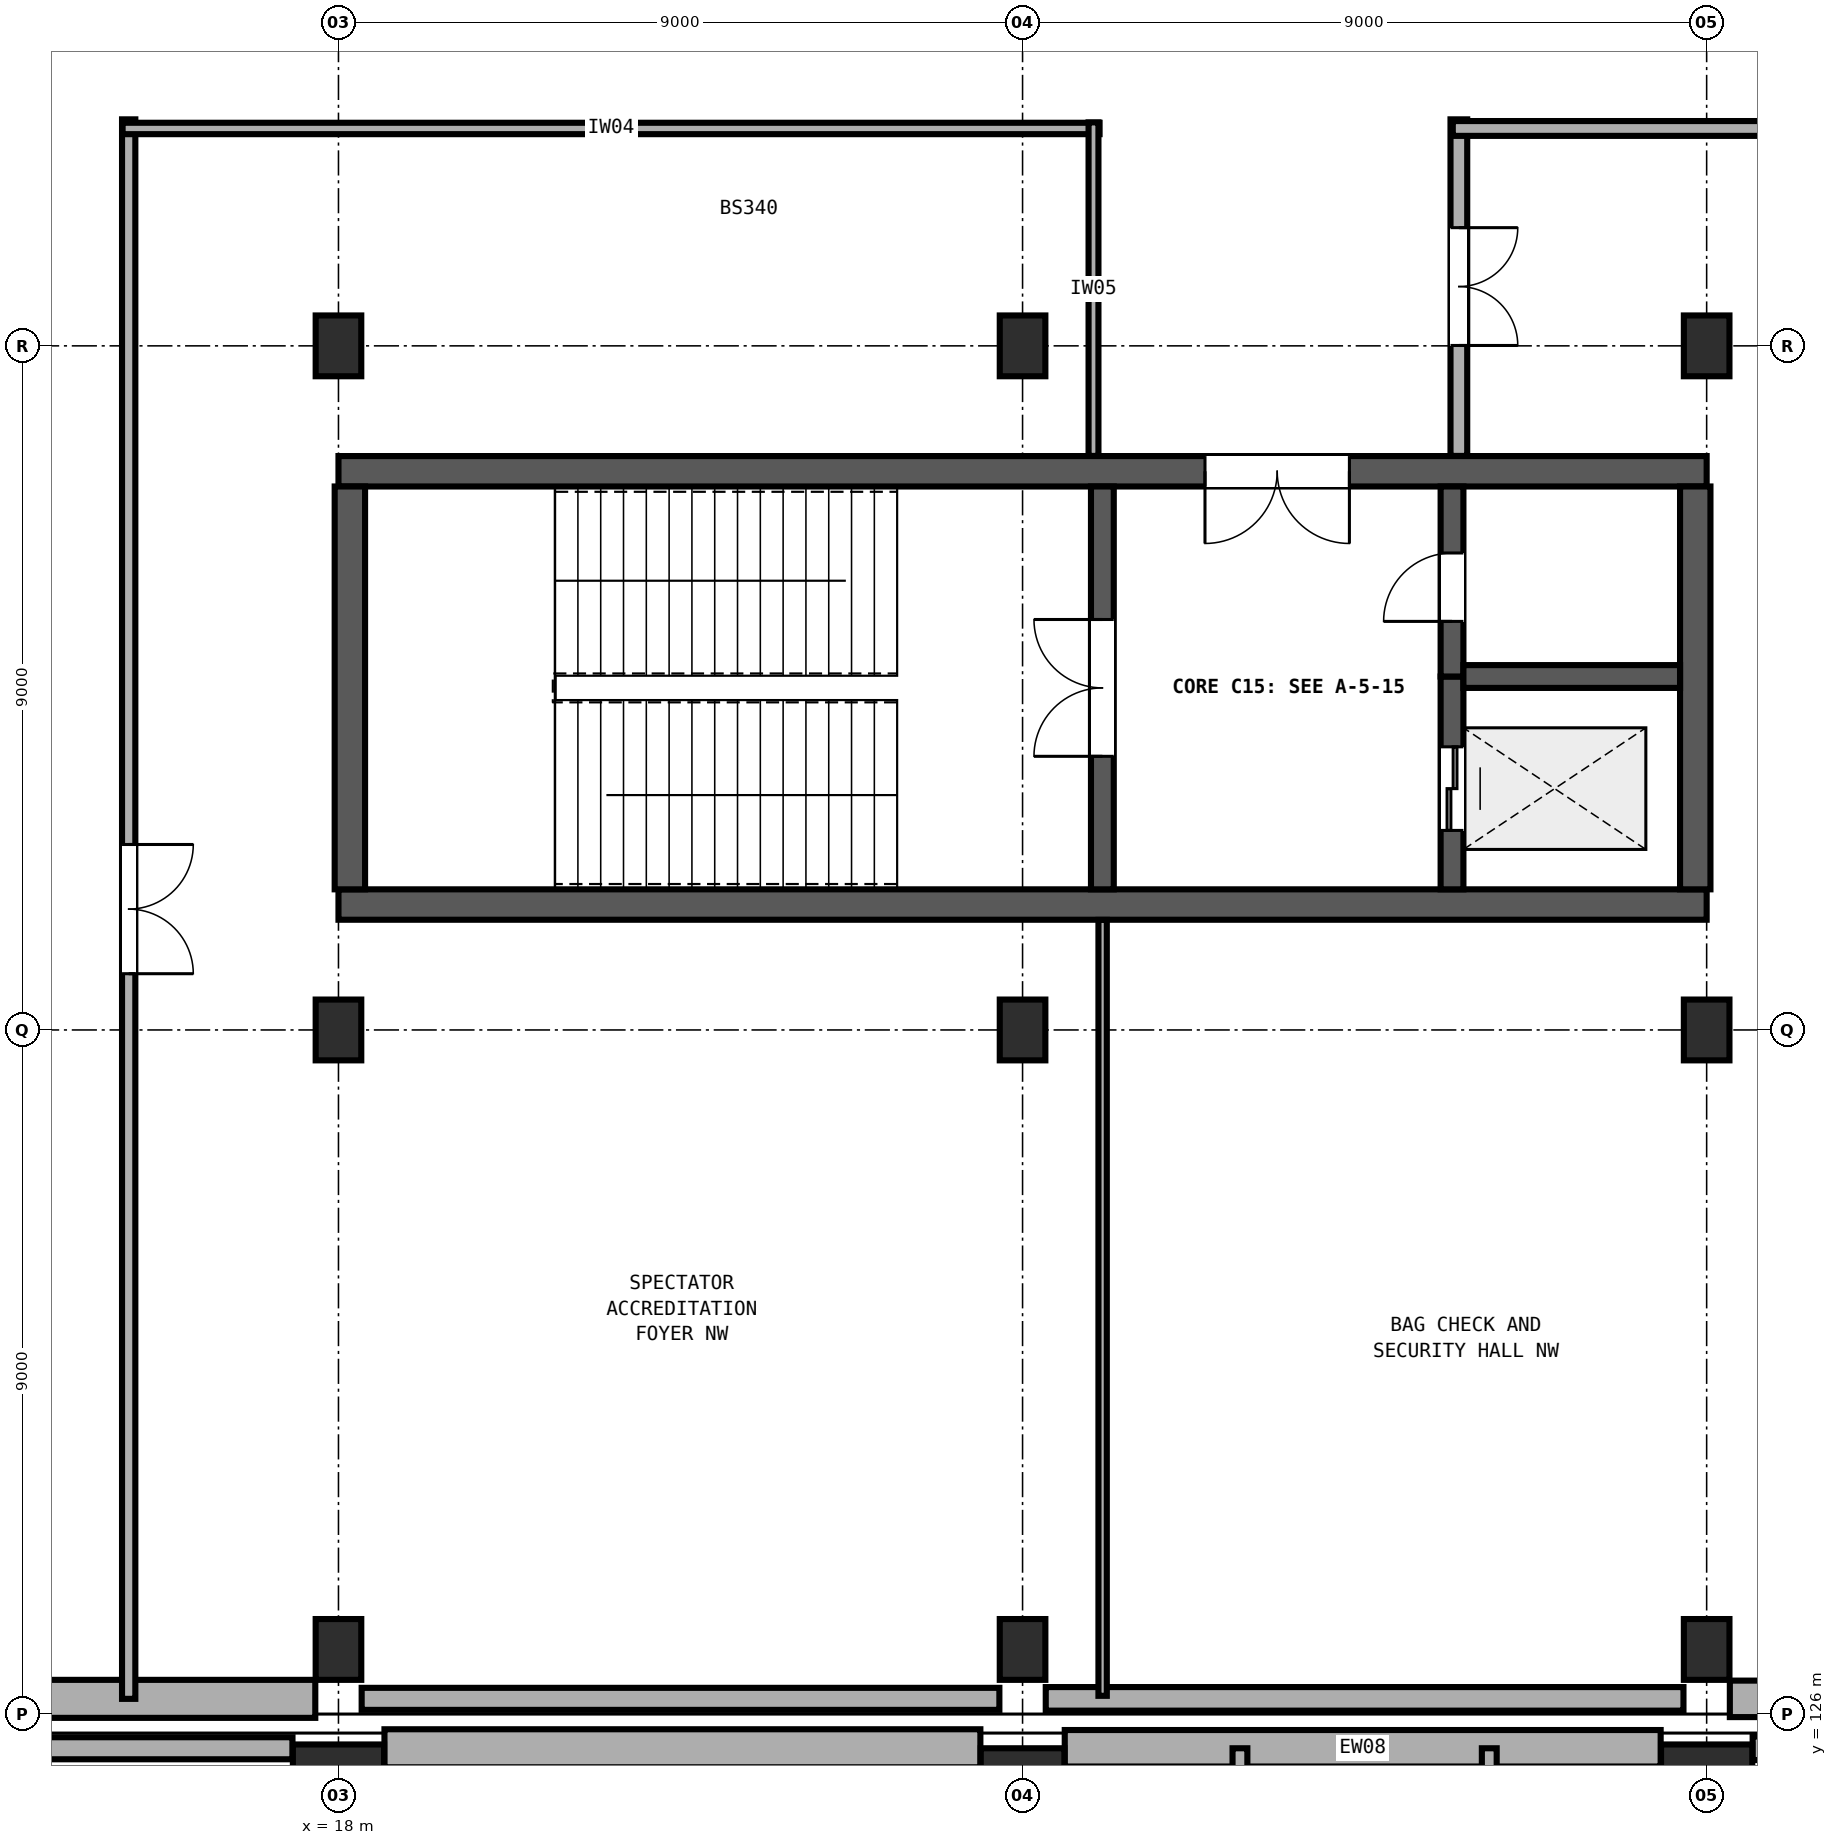
"""IFC4 building model, lengths in metres.
Left out: names, types, materials, properties, quantities, classifications, styles, units other than length and angle.
Written with IfcOpenShell. Run it as: python <this file> out.ifc"""

import sys

from ifc_helpers import new_model, si_unit, direction, frame, frame_2d, origin, origin_2d, place, context, subcontext, project, spatial, rectangle, extrude, element, fill, save


model = new_model("IFC4")
c1 = context("Model", 3, precision=1e-05, world=origin(), true_north=direction((0.0, 1.0)))
c2 = subcontext(c1, "Body", "Model", "MODEL_VIEW")
j1 = project(units=[si_unit("LENGTHUNIT", "METRE"), si_unit("PLANEANGLEUNIT", "RADIAN")], contexts=[c1])
p1 = place(None, origin())
s1 = spatial("IfcSite", under=j1, at=p1, CompositionType="ELEMENT")
p2 = place(p1, origin())
s2 = spatial("IfcBuilding", under=s1, at=p2, CompositionType="ELEMENT")
p3 = place(p2, origin())
s3 = spatial("IfcBuildingStorey", under=s2, at=p3, CompositionType="ELEMENT", Elevation=0.0)
p4 = place(p3, frame((18.0, 124.9, 0.0), z_axis=(0.0, 0.0, 1.0), x_axis=(1.0, 0.0, 0.0)))
e1 = element("IfcColumn", 1, at=p4, inside=s3, PredefinedType="COLUMN", context=c2, shape_type="SweptSolid", body=[
    extrude(rectangle(XDim=1.2, YDim=1.4, at=origin_2d()), origin(), (0.0, 0.0, 1.0), 4.8),
])
p5 = place(p3, frame((27.0, 124.9, 0.0), z_axis=(0.0, 0.0, 1.0), x_axis=(1.0, 0.0, 0.0)))
e2 = element("IfcColumn", 2, at=p5, inside=s3, PredefinedType="COLUMN", context=c2, shape_type="SweptSolid", body=[
    extrude(rectangle(XDim=1.1, YDim=1.3, at=origin_2d()), origin(), (0.0, 0.0, 1.0), 4.8),
])
p6 = place(p3, frame((36.0, 124.9, 0.0), z_axis=(0.0, 0.0, 1.0), x_axis=(1.0, 0.0, 0.0)))
e3 = element("IfcColumn", 3, at=p6, inside=s3, PredefinedType="COLUMN", context=c2, shape_type="SweptSolid", body=[
    extrude(rectangle(XDim=1.2, YDim=1.4, at=origin_2d()), origin(), (0.0, 0.0, 1.0), 4.8),
])
for number, where, z_axis, x_axis in (
    (4, (18.0, 126.85, 0.0), (0.0, 0.0, 1.0), (1.0, 0.0, 0.0)),
    (5, (18.0, 135.0, 0.0), (0.0, 0.0, 1.0), (1.0, 0.0, 0.0)),
    (6, (18.0, 144.0, 0.0), (0.0, 0.0, 1.0), (1.0, 0.0, 0.0)),
    (7, (27.0, 126.85, 0.0), (0.0, 0.0, 1.0), (1.0, 0.0, 0.0)),
    (8, (27.0, 135.0, 0.0), (0.0, 0.0, 1.0), (1.0, 0.0, 0.0)),
    (9, (27.0, 144.0, 0.0), (0.0, 0.0, 1.0), (1.0, 0.0, 0.0)),
    (10, (36.0, 126.85, 0.0), (0.0, 0.0, 1.0), (1.0, 0.0, 0.0)),
    (11, (36.0, 135.0, 0.0), (0.0, 0.0, 1.0), (1.0, 0.0, 0.0)),
    (12, (36.0, 144.0, 0.0), (0.0, 0.0, 1.0), (1.0, 0.0, 0.0)),
):
    element("IfcColumn", number, at=place(p3, frame(where, z_axis=z_axis, x_axis=x_axis)), inside=s3, PredefinedType="COLUMN", context=c2, shape_type="SweptSolid", body=[
        extrude(rectangle(XDim=0.6, YDim=0.8, at=origin_2d()), origin(), (0.0, 0.0, 1.0), 4.8),
    ])
p7 = place(p3, frame((18.0, 136.65, 0.0), z_axis=(0.0, 0.0, 1.0), x_axis=(1.0, 0.0, 0.0)))
e13 = element("IfcWall", 13, at=p7, inside=s3, PredefinedType="SHEAR", context=c2, shape_type="SweptSolid", body=[
    extrude(rectangle(XDim=18.0, YDim=0.4, at=frame_2d((9.0, 0.0))), origin(), (0.0, 0.0, 1.0), 4.5),
])
p8 = place(p3, frame((36.0, 142.35, 0.0), z_axis=(0.0, 0.0, 1.0), x_axis=(-1.0, 0.0, 0.0)))
e14 = element("IfcWall", 14, at=p8, inside=s3, PredefinedType="SHEAR", context=c2, shape_type="SweptSolid", body=[
    extrude(rectangle(XDim=18.0, YDim=0.4, at=frame_2d((9.0, 0.0))), origin(), (0.0, 0.0, 1.0), 4.5),
])
p9 = place(p8, frame((4.7, 0.0, 0.0)))
e15 = element("IfcOpeningElement", 15, at=p9, cuts=e14, PredefinedType="OPENING", context=c2, shape_type="SweptSolid", body=[
    extrude(rectangle(XDim=1.9, YDim=2.25, at=frame_2d((0.95, 1.125))), frame((0.0, 0.21, 0.0), z_axis=(0.0, -1.0, 0.0), x_axis=(1.0, 0.0, 0.0)), (0.0, 0.0, 1.0), 0.42),
])
for number, where, z_axis, x_axis in (
    (16, (18.15, 142.15, 0.0), (0.0, 0.0, 1.0), (0.0, -1.0, 0.0)),
    (17, (35.85, 136.85, 0.0), (0.0, 0.0, 1.0), (0.0, 1.0, 0.0)),
):
    element("IfcWall", number, at=place(p3, frame(where, z_axis=z_axis, x_axis=x_axis)), inside=s3, PredefinedType="SHEAR", context=c2, shape_type="SweptSolid", body=[
        extrude(rectangle(XDim=5.3, YDim=0.4, at=frame_2d((2.65, 0.0))), origin(), (0.0, 0.0, 1.0), 4.5),
    ])
p10 = place(p3, frame((28.05, 136.85, 0.0), z_axis=(0.0, 0.0, 1.0), x_axis=(0.0, 1.0, 0.0)))
e18 = element("IfcWall", 18, at=p10, inside=s3, PredefinedType="SHEAR", context=c2, shape_type="SweptSolid", body=[
    extrude(rectangle(XDim=5.3, YDim=0.3, at=frame_2d((2.65, 0.0))), origin(), (0.0, 0.0, 1.0), 4.5),
])
p11 = place(p10, frame((1.75, 0.0, 0.0)))
e19 = element("IfcOpeningElement", 19, at=p11, cuts=e18, PredefinedType="OPENING", context=c2, shape_type="SweptSolid", body=[
    extrude(rectangle(XDim=1.8, YDim=2.25, at=frame_2d((0.9, 1.125))), frame((0.0, 0.16, 0.0), z_axis=(0.0, -1.0, 0.0), x_axis=(1.0, 0.0, 0.0)), (0.0, 0.0, 1.0), 0.32),
])
p12 = place(p3, frame((32.65, 136.85, 0.0), z_axis=(0.0, 0.0, 1.0), x_axis=(0.0, 1.0, 0.0)))
e20 = element("IfcWall", 20, at=p12, inside=s3, PredefinedType="SHEAR", context=c2, shape_type="SweptSolid", body=[
    extrude(rectangle(XDim=2.8, YDim=0.3, at=frame_2d((1.4, 0.0))), origin(), (0.0, 0.0, 1.0), 4.5),
])
p13 = place(p12, frame((0.775, 0.0, 0.0)))
e21 = element("IfcOpeningElement", 21, at=p13, cuts=e20, PredefinedType="OPENING", context=c2, shape_type="SweptSolid", body=[
    extrude(rectangle(XDim=1.1, YDim=2.1, at=frame_2d((0.55, 1.05))), frame((0.0, 0.16, 0.0), z_axis=(0.0, -1.0, 0.0), x_axis=(1.0, 0.0, 0.0)), (0.0, 0.0, 1.0), 0.32),
])
p14 = place(p3, frame((32.65, 139.65, 0.0), z_axis=(0.0, 0.0, 1.0), x_axis=(0.0, 1.0, 0.0)))
e22 = element("IfcWall", 22, at=p14, inside=s3, PredefinedType="SHEAR", context=c2, shape_type="SweptSolid", body=[
    extrude(rectangle(XDim=2.5, YDim=0.3, at=frame_2d((1.25, 0.0))), origin(), (0.0, 0.0, 1.0), 4.5),
])
p15 = place(p14, frame((0.725, 0.0, 0.0)))
e23 = element("IfcOpeningElement", 23, at=p15, cuts=e22, PredefinedType="OPENING", context=c2, shape_type="SweptSolid", body=[
    extrude(rectangle(XDim=0.9, YDim=2.1, at=frame_2d((0.45, 1.05))), frame((0.0, 0.16, 0.0), z_axis=(0.0, -1.0, 0.0), x_axis=(1.0, 0.0, 0.0)), (0.0, 0.0, 1.0), 0.32),
])
p16 = place(p3, frame((32.8, 139.65, 0.0), z_axis=(0.0, 0.0, 1.0), x_axis=(1.0, 0.0, 0.0)))
e24 = element("IfcWall", 24, at=p16, inside=s3, PredefinedType="SHEAR", context=c2, shape_type="SweptSolid", body=[
    extrude(rectangle(XDim=2.85, YDim=0.3, at=frame_2d((1.425, 0.0))), origin(), (0.0, 0.0, 1.0), 4.5),
])
p17 = place(p3, frame((9.555, 125.55, 0.0), z_axis=(0.0, 0.0, 1.0), x_axis=(1.0, 0.0, 0.0)))
e25 = element("IfcWall", 25, at=p17, inside=s3, PredefinedType="SOLIDWALL", context=c2, shape_type="SweptSolid", body=[
    extrude(rectangle(XDim=7.84, YDim=0.29, at=frame_2d((3.92, 0.0))), origin(), (0.0, 0.0, 1.0), 3.28),
])
p18 = place(p3, frame((18.605, 125.55, 0.0), z_axis=(0.0, 0.0, 1.0), x_axis=(1.0, 0.0, 0.0)))
e26 = element("IfcWall", 26, at=p18, inside=s3, PredefinedType="SOLIDWALL", context=c2, shape_type="SweptSolid", body=[
    extrude(rectangle(XDim=7.84, YDim=0.5, at=frame_2d((3.92, 0.0))), origin(), (0.0, 0.0, 1.0), 3.28),
])
p19 = place(p3, frame((27.555, 125.55, 0.0), z_axis=(0.0, 0.0, 1.0), x_axis=(1.0, 0.0, 0.0)))
e27 = element("IfcWall", 27, at=p19, inside=s3, PredefinedType="SOLIDWALL", context=c2, shape_type="SweptSolid", body=[
    extrude(rectangle(XDim=7.84, YDim=0.48, at=frame_2d((3.92, 0.0))), origin(), (0.0, 0.0, 1.0), 3.28),
])
p20 = place(p3, frame((36.605, 125.55, 0.0), z_axis=(0.0, 0.0, 1.0), x_axis=(1.0, 0.0, 0.0)))
e28 = element("IfcWall", 28, at=p20, inside=s3, PredefinedType="SOLIDWALL", context=c2, shape_type="SweptSolid", body=[
    extrude(rectangle(XDim=7.14, YDim=0.31, at=frame_2d((3.57, 0.0))), origin(), (0.0, 0.0, 1.0), 3.28),
])
p21 = place(p3, frame((44.695, 126.2, 0.0), z_axis=(0.0, 0.0, 1.0), x_axis=(-1.0, 0.0, 0.0)))
e29 = element("IfcWall", 29, at=p21, inside=s3, PredefinedType="SOLIDWALL", context=c2, shape_type="SweptSolid", body=[
    extrude(rectangle(XDim=8.39, YDim=0.48, at=frame_2d((4.195, 0.0))), origin(), (0.0, 0.0, 1.0), 3.28),
])
p22 = place(p3, frame((35.695, 126.2, 0.0), z_axis=(0.0, 0.0, 1.0), x_axis=(-1.0, 0.0, 0.0)))
e30 = element("IfcWall", 30, at=p22, inside=s3, PredefinedType="SOLIDWALL", context=c2, shape_type="SweptSolid", body=[
    extrude(rectangle(XDim=8.39, YDim=0.31, at=frame_2d((4.195, 0.0))), origin(), (0.0, 0.0, 1.0), 3.28),
])
p23 = place(p3, frame((26.695, 126.2, 0.0), z_axis=(0.0, 0.0, 1.0), x_axis=(-1.0, 0.0, 0.0)))
e31 = element("IfcWall", 31, at=p23, inside=s3, PredefinedType="SOLIDWALL", context=c2, shape_type="SweptSolid", body=[
    extrude(rectangle(XDim=8.39, YDim=0.29, at=frame_2d((4.195, 0.0))), origin(), (0.0, 0.0, 1.0), 3.28),
])
p24 = place(p3, frame((17.695, 126.2, 0.0), z_axis=(0.0, 0.0, 1.0), x_axis=(-1.0, 0.0, 0.0)))
e32 = element("IfcWall", 32, at=p24, inside=s3, PredefinedType="SOLIDWALL", context=c2, shape_type="SweptSolid", body=[
    extrude(rectangle(XDim=8.39, YDim=0.5, at=frame_2d((4.195, 0.0))), origin(), (0.0, 0.0, 1.0), 3.28),
])
p25 = place(p3, frame((17.95, 125.51, 0.0), z_axis=(0.0, 0.0, 1.0), x_axis=(0.0, -1.0, 0.0)))
e33 = element("IfcWall", 33, at=p25, inside=s3, PredefinedType="PARTITIONING", context=c2, shape_type="SweptSolid", body=[
    extrude(rectangle(XDim=16.658, YDim=0.15, at=frame_2d((8.329, 0.0))), origin(), (0.0, 0.0, 1.0), 3.28),
])
p26 = place(p3, frame((29.86, 102.77, 0.0), z_axis=(0.0, 0.0, 1.0), x_axis=(0.0, 1.0, 0.0)))
e34 = element("IfcWall", 34, at=p26, inside=s3, PredefinedType="PARTITIONING", context=c2, shape_type="SweptSolid", body=[
    extrude(rectangle(XDim=22.78, YDim=0.195, at=frame_2d((11.39, 0.0))), origin(), (0.0, 0.0, 1.0), 3.28),
])
p27 = place(p26, frame((10.54, 0.0, 0.0)))
e35 = element("IfcOpeningElement", 35, at=p27, cuts=e34, PredefinedType="OPENING", context=c2, shape_type="SweptSolid", body=[
    extrude(rectangle(XDim=1.7, YDim=2.2, at=frame_2d((0.85, 1.1))), frame((0.0, 0.107, 0.0), z_axis=(0.0, -1.0, 0.0), x_axis=(1.0, 0.0, 0.0)), (0.0, 0.0, 1.0), 0.215),
])
p28 = place(p3, frame((33.14, 125.55, 0.0), z_axis=(0.0, 0.0, 1.0), x_axis=(0.0, -1.0, 0.0)))
e36 = element("IfcWall", 36, at=p28, inside=s3, PredefinedType="PARTITIONING", context=c2, shape_type="SweptSolid", body=[
    extrude(rectangle(XDim=17.892, YDim=0.195, at=frame_2d((8.946, 0.0))), origin(), (0.0, 0.0, 1.0), 3.28),
])
p29 = place(p28, frame((8.096, 0.0, 0.0)))
e37 = element("IfcOpeningElement", 37, at=p29, cuts=e36, PredefinedType="OPENING", context=c2, shape_type="SweptSolid", body=[
    extrude(rectangle(XDim=1.7, YDim=2.2, at=frame_2d((0.85, 1.1))), frame((0.0, 0.107, 0.0), z_axis=(0.0, -1.0, 0.0), x_axis=(1.0, 0.0, 0.0)), (0.0, 0.0, 1.0), 0.215),
])
p30 = place(p3, frame((15.24, 146.98, 0.0), z_axis=(0.0, 0.0, 1.0), x_axis=(0.0, -1.0, 0.0)))
e38 = element("IfcWall", 38, at=p30, inside=s3, PredefinedType="PARTITIONING", context=c2, shape_type="SweptSolid", body=[
    extrude(rectangle(XDim=20.78, YDim=0.175, at=frame_2d((10.39, 0.0))), origin(), (0.0, 0.0, 1.0), 3.28),
])
p31 = place(p30, frame((9.54, 0.0, 0.0)))
e39 = element("IfcOpeningElement", 39, at=p31, cuts=e38, PredefinedType="OPENING", context=c2, shape_type="SweptSolid", body=[
    extrude(rectangle(XDim=1.7, YDim=2.2, at=frame_2d((0.85, 1.1))), frame((0.0, 0.097, 0.0), z_axis=(0.0, -1.0, 0.0), x_axis=(1.0, 0.0, 0.0)), (0.0, 0.0, 1.0), 0.195),
])
p32 = place(p3, frame((15.16, 146.86, 0.0), z_axis=(0.0, 0.0, 1.0), x_axis=(1.0, 0.0, 0.0)))
e40 = element("IfcWall", 40, at=p32, inside=s3, PredefinedType="PARTITIONING", context=c2, shape_type="SweptSolid", body=[
    extrude(rectangle(XDim=12.853, YDim=0.15, at=frame_2d((6.427, 0.0))), origin(), (0.0, 0.0, 1.0), 3.28),
])
p33 = place(p3, frame((27.933, 146.94, 0.0), z_axis=(0.0, 0.0, 1.0), x_axis=(0.0, -1.0, 0.0)))
e41 = element("IfcWall", 41, at=p33, inside=s3, PredefinedType="PARTITIONING", context=c2, shape_type="SweptSolid", body=[
    extrude(rectangle(XDim=4.388, YDim=0.13, at=frame_2d((2.194, 0.0))), origin(), (0.0, 0.0, 1.0), 3.28),
])
p34 = place(p3, frame((28.053, 136.448, 0.0), z_axis=(0.0, 0.0, 1.0), x_axis=(0.0, -1.0, 0.0)))
e42 = element("IfcWall", 42, at=p34, inside=s3, PredefinedType="PARTITIONING", context=c2, shape_type="SweptSolid", body=[
    extrude(rectangle(XDim=10.208, YDim=0.11, at=frame_2d((5.104, 0.0))), origin(), (0.0, 0.0, 1.0), 3.28),
])
p35 = place(p3, frame((32.74, 146.98, 0.0), z_axis=(0.0, 0.0, 1.0), x_axis=(0.0, -1.0, 0.0)))
e43 = element("IfcWall", 43, at=p35, inside=s3, PredefinedType="PARTITIONING", context=c2, shape_type="SweptSolid", body=[
    extrude(rectangle(XDim=4.428, YDim=0.22, at=frame_2d((2.214, 0.0))), origin(), (0.0, 0.0, 1.0), 3.28),
])
p36 = place(p35, frame((1.425, 0.0, 0.0)))
e44 = element("IfcOpeningElement", 44, at=p36, cuts=e43, PredefinedType="OPENING", context=c2, shape_type="SweptSolid", body=[
    extrude(rectangle(XDim=1.55, YDim=2.2, at=frame_2d((0.775, 1.1))), frame((0.0, 0.12, 0.0), z_axis=(0.0, -1.0, 0.0), x_axis=(1.0, 0.0, 0.0)), (0.0, 0.0, 1.0), 0.24),
])
p37 = place(p3, frame((32.66, 146.86, 0.0), z_axis=(0.0, 0.0, 1.0), x_axis=(1.0, 0.0, 0.0)))
e45 = element("IfcWall", 45, at=p37, inside=s3, PredefinedType="PARTITIONING", context=c2, shape_type="SweptSolid", body=[
    extrude(rectangle(XDim=8.167, YDim=0.195, at=frame_2d((4.083, 0.0))), origin(), (0.0, 0.0, 1.0), 3.28),
])
p38 = place(p11, origin())
e46 = element("IfcDoor", 46, at=p38, inside=s3, OperationType="DOUBLE_DOOR_SINGLE_SWING", PredefinedType="DOOR", context=c2, shape_type="SweptSolid", body=[
    extrude(rectangle(XDim=1.8, YDim=2.25, at=frame_2d((0.9, 1.125))), frame((0.0, 0.025, 0.0), z_axis=(0.0, -1.0, 0.0), x_axis=(1.0, 0.0, 0.0)), (0.0, 0.0, 1.0), 0.05),
])
fill(e19, e46)
p39 = place(p15, origin())
e47 = element("IfcDoor", 47, at=p39, inside=s3, OperationType="SINGLE_SWING_LEFT", PredefinedType="DOOR", context=c2, shape_type="SweptSolid", body=[
    extrude(rectangle(XDim=0.9, YDim=2.1, at=frame_2d((0.45, 1.05))), frame((0.0, 0.025, 0.0), z_axis=(0.0, -1.0, 0.0), x_axis=(1.0, 0.0, 0.0)), (0.0, 0.0, 1.0), 0.05),
])
fill(e23, e47)
p40 = place(p13, origin())
e48 = element("IfcDoor", 48, at=p40, inside=s3, OperationType="DOUBLE_DOOR_SLIDING", PredefinedType="DOOR", context=c2, shape_type="SweptSolid", body=[
    extrude(rectangle(XDim=1.1, YDim=2.1, at=frame_2d((0.55, 1.05))), frame((0.0, 0.025, 0.0), z_axis=(0.0, -1.0, 0.0), x_axis=(1.0, 0.0, 0.0)), (0.0, 0.0, 1.0), 0.05),
])
fill(e21, e48)
p41 = place(p9, origin())
e49 = element("IfcDoor", 49, at=p41, inside=s3, OperationType="DOUBLE_DOOR_SINGLE_SWING", PredefinedType="DOOR", context=c2, shape_type="SweptSolid", body=[
    extrude(rectangle(XDim=1.9, YDim=2.25, at=frame_2d((0.95, 1.125))), frame((0.0, 0.025, 0.0), z_axis=(0.0, -1.0, 0.0), x_axis=(1.0, 0.0, 0.0)), (0.0, 0.0, 1.0), 0.05),
])
fill(e15, e49)
p42 = place(p31, origin())
e50 = element("IfcDoor", 50, at=p42, inside=s3, OperationType="DOUBLE_DOOR_SINGLE_SWING", PredefinedType="DOOR", context=c2, shape_type="SweptSolid", body=[
    extrude(rectangle(XDim=1.7, YDim=2.2, at=frame_2d((0.85, 1.1))), frame((0.0, 0.025, 0.0), z_axis=(0.0, -1.0, 0.0), x_axis=(1.0, 0.0, 0.0)), (0.0, 0.0, 1.0), 0.05),
])
fill(e39, e50)
p43 = place(p36, origin())
e51 = element("IfcDoor", 51, at=p43, inside=s3, OperationType="DOUBLE_DOOR_SINGLE_SWING", PredefinedType="DOOR", context=c2, shape_type="SweptSolid", body=[
    extrude(rectangle(XDim=1.55, YDim=2.2, at=frame_2d((0.775, 1.1))), frame((0.0, 0.025, 0.0), z_axis=(0.0, -1.0, 0.0), x_axis=(1.0, 0.0, 0.0)), (0.0, 0.0, 1.0), 0.05),
])
fill(e44, e51)
save(model, sys.argv[1])
